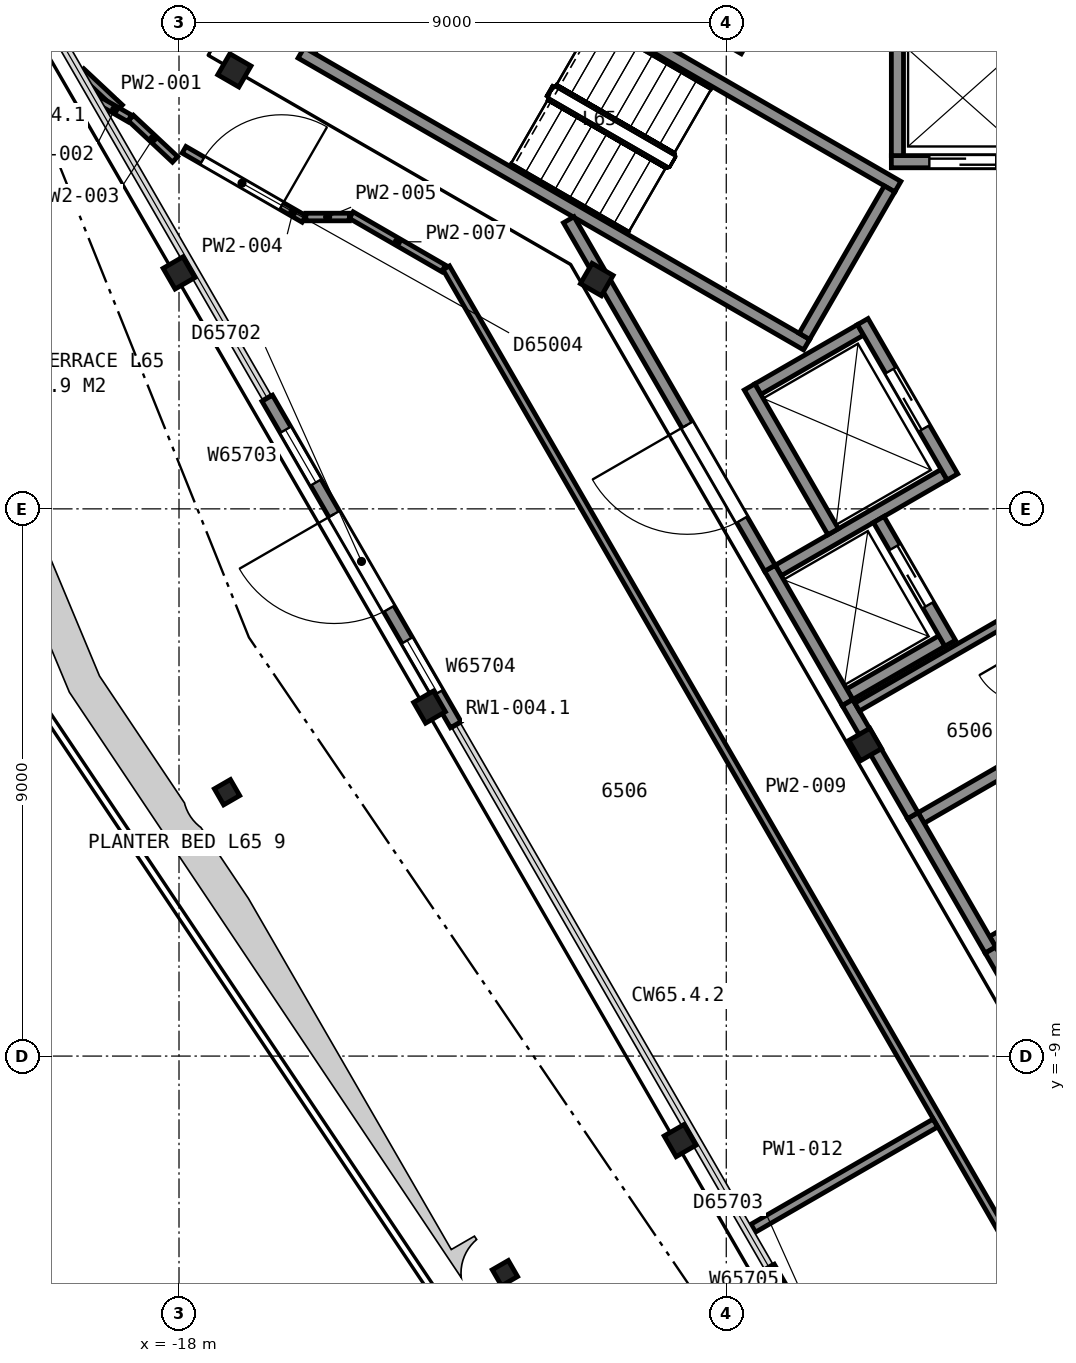
"""IFC4 building model, lengths in metres.
Left out: names, types, materials, properties, quantities, classifications, styles, units other than length and angle.
Written with IfcOpenShell. Run it as: python <this file> out.ifc"""

import sys

from ifc_helpers import new_model, si_unit, direction, frame, frame_2d, origin, origin_2d, place, context, subcontext, project, spatial, rectangle, hollow_rectangle, i_section, extrude, element, fill, save


model = new_model("IFC4")
c1 = context("Model", 3, precision=1e-05, world=origin(), true_north=direction((0.0, 1.0)))
c2 = subcontext(c1, "Body", "Model", "MODEL_VIEW")
j1 = project(units=[si_unit("LENGTHUNIT", "METRE"), si_unit("PLANEANGLEUNIT", "RADIAN")], contexts=[c1])
p1 = place(None, origin())
s1 = spatial("IfcSite", under=j1, at=p1, CompositionType="ELEMENT")
p2 = place(p1, origin())
s2 = spatial("IfcBuilding", under=s1, at=p2, CompositionType="ELEMENT")
p3 = place(p2, frame((0.0, 0.0, 258.2)))
s3 = spatial("IfcBuildingStorey", under=s2, at=p3, CompositionType="ELEMENT", Elevation=258.2)
for number, where, z_axis, x_axis in (
    (1, (-18.0, 3.88, -0.16), (0.0, 0.0, 1.0), (-0.5, 0.866, 0.0)),
    (2, (-13.88, -3.26, -0.16), (0.0, 0.0, 1.0), (-0.5, 0.866, 0.0)),
    (3, (-9.76, -10.39, -0.16), (0.0, 0.0, 1.0), (-0.5, 0.866, 0.0)),
):
    element("IfcColumn", number, at=place(p3, frame(where, z_axis=z_axis, x_axis=x_axis)), inside=s3, PredefinedType="COLUMN", context=c2, shape_type="SweptSolid", body=[
        extrude(i_section(OverallWidth=0.394, OverallDepth=0.376, WebThickness=0.017, FlangeThickness=0.028, FilletRadius=0.015, at=origin_2d()), origin(), (0.0, 0.0, 1.0), 5.96),
    ])
p4 = place(p3, frame((-9.237, 7.987, 0.065), z_axis=(0.331346299182, -0.19115367602, 0.923942585966), x_axis=(0.941301037418, 1.5106804e-05, -0.337568299352)))
e4 = element("IfcColumn", 4, at=p4, inside=s3, PredefinedType="COLUMN", context=c2, shape_type="SweptSolid", body=[
    extrude(i_section(OverallWidth=0.399, OverallDepth=0.386, WebThickness=0.021, FlangeThickness=0.033, FilletRadius=0.015, at=origin_2d()), origin(), (0.0, 0.0, 1.0), 6.137),
])
p5 = place(p3, frame((-17.502, 7.45, 0.05), z_axis=(0.331353135415, -0.19118201328, 0.923934271174), x_axis=(0.50003321387, 0.866006216706, -0.000132867899)))
e5 = element("IfcColumn", 5, at=p5, inside=s3, PredefinedType="COLUMN", context=c2, shape_type="SweptSolid", body=[
    extrude(i_section(OverallWidth=0.401, OverallDepth=0.399, WebThickness=0.025, FlangeThickness=0.04, FilletRadius=0.015, at=origin_2d()), origin(), (0.0, 0.0, 1.0), 6.169),
])
p6 = place(p3, frame((-11.537, 4.007, 0.065), z_axis=(0.331310883947, -0.191156195649, 0.923954764609), x_axis=(0.941310345781, -3.9186308e-05, -0.337542340145)))
e6 = element("IfcColumn", 6, at=p6, inside=s3, PredefinedType="COLUMN", context=c2, shape_type="SweptSolid", body=[
    extrude(i_section(OverallWidth=0.399, OverallDepth=0.386, WebThickness=0.021, FlangeThickness=0.033, FilletRadius=0.015, at=origin_2d()), origin(), (0.0, 0.0, 1.0), 6.137),
])
p7 = place(p3, frame((-6.923, -3.996, 0.04), z_axis=(0.175584774284, 0.101313376069, 0.979237247489), x_axis=(0.984300834882, 5.9817855e-05, -0.176498903317)))
e7 = element("IfcColumn", 7, at=p7, inside=s3, PredefinedType="COLUMN", context=c2, shape_type="SweptSolid", body=[
    extrude(i_section(OverallWidth=0.399, OverallDepth=0.386, WebThickness=0.021, FlangeThickness=0.033, FilletRadius=0.015, at=origin_2d()), origin(), (0.0, 0.0, 1.0), 5.841),
])
for number, where, z_axis, x_axis in (
    (8, (-17.21, -4.66, -0.69), (0.0, 0.0, 1.0), (-0.5, 0.866, 0.0)),
    (9, (-12.64, -12.57, -0.69), (0.0, 0.0, 1.0), (-0.5, 0.866, 0.0)),
):
    element("IfcColumn", number, at=place(p3, frame(where, z_axis=z_axis, x_axis=x_axis)), inside=s3, PredefinedType="COLUMN", context=c2, shape_type="SweptSolid", body=[
        extrude(hollow_rectangle(XDim=0.305, YDim=0.305, WallThickness=0.013, InnerFilletRadius=0.006, OuterFilletRadius=0.019, at=origin_2d()), origin(), (0.0, 0.0, 1.0), 5.4),
    ])
p8 = place(p3, frame((-16.549, 1.82, 0.0), z_axis=(0.0, 0.0, 1.0), x_axis=(0.500009909098, -0.866019682689, 0.0)))
e10 = element("IfcWall", 10, at=p8, inside=s3, PredefinedType="SOLIDWALL", context=c2, shape_type="SweptSolid", body=[
    extrude(rectangle(XDim=6.2, YDim=0.2, at=frame_2d((3.1, 0.0))), origin(), (0.0, 0.0, 1.0), 4.522),
])
p9 = place(p8, frame((0.6, 0.0, 0.9)))
e11 = element("IfcOpeningElement", 11, at=p9, cuts=e10, PredefinedType="OPENING", context=c2, shape_type="SweptSolid", body=[
    extrude(rectangle(XDim=1.0, YDim=1.5, at=frame_2d((0.5, 0.75))), frame((0.0, 0.11, 0.0), z_axis=(0.0, -1.0, 0.0), x_axis=(1.0, 0.0, 0.0)), (0.0, 0.0, 1.0), 0.22),
])
p10 = place(p8, frame((2.2, 0.0, 0.0)))
e12 = element("IfcOpeningElement", 12, at=p10, cuts=e10, PredefinedType="OPENING", context=c2, shape_type="SweptSolid", body=[
    extrude(rectangle(XDim=1.8, YDim=2.4, at=frame_2d((0.9, 1.2))), frame((0.0, 0.11, 0.0), z_axis=(0.0, -1.0, 0.0), x_axis=(1.0, 0.0, 0.0)), (0.0, 0.0, 1.0), 0.22),
])
p11 = place(p8, frame((4.6, 0.0, 0.9)))
e13 = element("IfcOpeningElement", 13, at=p11, cuts=e10, PredefinedType="OPENING", context=c2, shape_type="SweptSolid", body=[
    extrude(rectangle(XDim=1.0, YDim=1.5, at=frame_2d((0.5, 0.75))), frame((0.0, 0.11, 0.0), z_axis=(0.0, -1.0, 0.0), x_axis=(1.0, 0.0, 0.0)), (0.0, 0.0, 1.0), 0.22),
])
p12 = place(p3, frame((-8.296, -12.474, 0.0), z_axis=(0.0, 0.0, 1.0), x_axis=(0.500026960575, -0.86600983753, 0.0)))
e14 = element("IfcWall", 14, at=p12, inside=s3, PredefinedType="SOLIDWALL", context=c2, shape_type="SweptSolid", body=[
    extrude(rectangle(XDim=6.2, YDim=0.2, at=frame_2d((3.1, 0.0))), origin(), (0.0, 0.0, 1.0), 4.522),
])
p13 = place(p12, frame((0.6, 0.0, 0.9)))
e15 = element("IfcOpeningElement", 15, at=p13, cuts=e14, PredefinedType="OPENING", context=c2, shape_type="SweptSolid", body=[
    extrude(rectangle(XDim=1.0, YDim=1.5, at=frame_2d((0.5, 0.75))), frame((0.0, 0.11, 0.0), z_axis=(0.0, -1.0, 0.0), x_axis=(1.0, 0.0, 0.0)), (0.0, 0.0, 1.0), 0.22),
])
p14 = place(p12, frame((2.2, 0.0, 0.0)))
e16 = element("IfcOpeningElement", 16, at=p14, cuts=e14, PredefinedType="OPENING", context=c2, shape_type="SweptSolid", body=[
    extrude(rectangle(XDim=1.8, YDim=2.4, at=frame_2d((0.9, 1.2))), frame((0.0, 0.11, 0.0), z_axis=(0.0, -1.0, 0.0), x_axis=(1.0, 0.0, 0.0)), (0.0, 0.0, 1.0), 0.22),
])
p15 = place(p12, frame((4.6, 0.0, 0.9)))
e17 = element("IfcOpeningElement", 17, at=p15, cuts=e14, PredefinedType="OPENING", context=c2, shape_type="SweptSolid", body=[
    extrude(rectangle(XDim=1.0, YDim=1.5, at=frame_2d((0.5, 0.75))), frame((0.0, 0.11, 0.0), z_axis=(0.0, -1.0, 0.0), x_axis=(1.0, 0.0, 0.0)), (0.0, 0.0, 1.0), 0.22),
])
p16 = place(p3, frame((-14.455, 9.962, 0.0), z_axis=(0.0, 0.0, 1.0), x_axis=(-0.500049511043, -0.865996816683, 0.0)))
e18 = element("IfcWall", 18, at=p16, inside=s3, PredefinedType="PARTITIONING", context=c2, shape_type="SweptSolid", body=[
    extrude(rectangle(XDim=2.8, YDim=0.2, at=frame_2d((1.4, 0.0))), origin(), (0.0, 0.0, 1.0), 5.55),
])
p17 = place(p16, frame((0.85, 0.0, 0.0)))
e19 = element("IfcOpeningElement", 19, at=p17, cuts=e18, PredefinedType="OPENING", context=c2, shape_type="SweptSolid", body=[
    extrude(rectangle(XDim=1.1, YDim=2.1, at=frame_2d((0.55, 1.05))), frame((0.0, 0.11, 0.0), z_axis=(0.0, -1.0, 0.0), x_axis=(1.0, 0.0, 0.0)), (0.0, 0.0, 1.0), 0.22),
])
for number, where, z_axis, x_axis in (
    (20, (-7.678, 2.701, 0.0), (0.0, 0.0, 1.0), (-0.866, 0.5, 0.0)),
    (21, (-6.178, 5.299, 0.0), (0.0, 0.0, 1.0), (-0.866, 0.5, 0.0)),
):
    element("IfcWall", number, at=place(p3, frame(where, z_axis=z_axis, x_axis=x_axis)), inside=s3, PredefinedType="PARTITIONING", context=c2, shape_type="SweptSolid", body=[
        extrude(rectangle(XDim=9.6, YDim=0.2, at=frame_2d((4.8, 0.0))), origin(), (0.0, 0.0, 1.0), 5.55),
    ])
p18 = place(p3, frame((-6.315, 5.262, 0.0), z_axis=(0.0, 0.0, 1.0), x_axis=(-0.500049511043, -0.865996816683, 0.0)))
e22 = element("IfcWall", 22, at=p18, inside=s3, PredefinedType="PARTITIONING", context=c2, shape_type="SweptSolid", body=[
    extrude(rectangle(XDim=2.8, YDim=0.2, at=frame_2d((1.4, 0.0))), origin(), (0.0, 0.0, 1.0), 5.55),
])
p19 = place(p3, frame((-6.285, 5.71, 0.0), z_axis=(0.0, 0.0, 1.0), x_axis=(1.0, 0.0, 0.0)))
e23 = element("IfcWall", 23, at=p19, inside=s3, PredefinedType="PARTITIONING", context=c2, shape_type="SweptSolid", body=[
    extrude(rectangle(XDim=2.35, YDim=0.2, at=frame_2d((1.175, 0.0))), origin(), (0.0, 0.0, 1.0), 5.55),
])
p20 = place(p19, frame((0.625, 0.0, 0.0)))
e24 = element("IfcOpeningElement", 24, at=p20, cuts=e23, PredefinedType="OPENING", context=c2, shape_type="SweptSolid", body=[
    extrude(rectangle(XDim=1.1, YDim=2.1, at=frame_2d((0.55, 1.05))), frame((0.0, 0.11, 0.0), z_axis=(0.0, -1.0, 0.0), x_axis=(1.0, 0.0, 0.0)), (0.0, 0.0, 1.0), 0.22),
])
p21 = place(p3, frame((-4.62, -7.118, 0.0), z_axis=(0.0, 0.0, 1.0), x_axis=(0.866039495442, 0.49997559174, 0.0)))
e25 = element("IfcWall", 25, at=p21, inside=s3, PredefinedType="PARTITIONING", context=c2, shape_type="SweptSolid", body=[
    extrude(rectangle(XDim=2.95, YDim=0.2, at=frame_2d((1.475, 0.0))), origin(), (0.0, 0.0, 1.0), 4.933),
])
for number, where, z_axis, x_axis in (
    (26, (-5.795, -5.083, 0.0), (0.0, 0.0, 1.0), (0.866, 0.5, 0.0)),
    (27, (-6.97, -3.048, 0.0), (0.0, 0.0, 1.0), (0.866, 0.5, 0.0)),
):
    element("IfcWall", number, at=place(p3, frame(where, z_axis=z_axis, x_axis=x_axis)), inside=s3, PredefinedType="PARTITIONING", context=c2, shape_type="SweptSolid", body=[
        extrude(rectangle(XDim=1.75, YDim=0.2, at=frame_2d((0.875, 0.0))), origin(), (0.0, 0.0, 1.0), 4.933),
    ])
p22 = place(p3, frame((-8.145, -1.013, 0.0), z_axis=(0.0, 0.0, 1.0), x_axis=(0.866016494683, 0.500015430699, 0.0)))
e28 = element("IfcWall", 28, at=p22, inside=s3, PredefinedType="PARTITIONING", context=c2, shape_type="SweptSolid", body=[
    extrude(rectangle(XDim=3.15, YDim=0.2, at=frame_2d((1.575, 0.0))), origin(), (0.0, 0.0, 1.0), 4.933),
])
p23 = place(p3, frame((-8.48, 1.969, 0.0), z_axis=(0.0, 0.0, 1.0), x_axis=(0.866000020948, 0.500043961785, 0.0)))
e29 = element("IfcWall", 29, at=p23, inside=s3, PredefinedType="PARTITIONING", context=c2, shape_type="SweptSolid", body=[
    extrude(rectangle(XDim=1.95, YDim=0.2, at=frame_2d((0.975, 0.0))), origin(), (0.0, 0.0, 1.0), 5.8),
])
p24 = place(p3, frame((-6.185, 5.81, 0.0), z_axis=(0.0, 0.0, 1.0), x_axis=(0.0, 1.0, 0.0)))
e30 = element("IfcWall", 30, at=p24, inside=s3, PredefinedType="PARTITIONING", context=c2, shape_type="SweptSolid", body=[
    extrude(rectangle(XDim=1.75, YDim=0.2, at=frame_2d((0.875, 0.0))), origin(), (0.0, 0.0, 1.0), 4.933),
])
p25 = place(p3, frame((-5.28, 0.525, 0.0), z_axis=(0.0, 0.0, 1.0), x_axis=(-0.500037662692, 0.866003658127, 0.0)))
e31 = element("IfcWall", 31, at=p25, inside=s3, PredefinedType="PARTITIONING", context=c2, shape_type="SweptSolid", body=[
    extrude(rectangle(XDim=2.95, YDim=0.2, at=frame_2d((1.475, 0.0))), origin(), (0.0, 0.0, 1.0), 5.8),
])
p26 = place(p25, frame((0.925, 0.0, 0.0)))
e32 = element("IfcOpeningElement", 32, at=p26, cuts=e31, PredefinedType="OPENING", context=c2, shape_type="SweptSolid", body=[
    extrude(rectangle(XDim=1.1, YDim=2.1, at=frame_2d((0.55, 1.05))), frame((0.0, 0.11, 0.0), z_axis=(0.0, -1.0, 0.0), x_axis=(1.0, 0.0, 0.0)), (0.0, 0.0, 1.0), 0.22),
])
p27 = place(p3, frame((-5.318, -2.21, 0.0), z_axis=(0.0, 0.0, 1.0), x_axis=(-0.499938297808, 0.866061024631, 0.0)))
e33 = element("IfcWall", 33, at=p27, inside=s3, PredefinedType="PARTITIONING", context=c2, shape_type="SweptSolid", body=[
    extrude(rectangle(XDim=2.35, YDim=0.2, at=frame_2d((1.175, 0.0))), origin(), (0.0, 0.0, 1.0), 5.55),
])
p28 = place(p27, frame((0.725, 0.0, 0.0)))
e34 = element("IfcOpeningElement", 34, at=p28, cuts=e33, PredefinedType="OPENING", context=c2, shape_type="SweptSolid", body=[
    extrude(rectangle(XDim=1.1, YDim=2.1, at=frame_2d((0.55, 1.05))), frame((0.0, 0.11, 0.0), z_axis=(0.0, -1.0, 0.0), x_axis=(1.0, 0.0, 0.0)), (0.0, 0.0, 1.0), 0.22),
])
p29 = place(p3, frame((-7.242, -0.376, 0.0), z_axis=(0.0, 0.0, 1.0), x_axis=(-0.499996545922, 0.866027397988, 0.0)))
e35 = element("IfcWall", 35, at=p29, inside=s3, PredefinedType="PARTITIONING", context=c2, shape_type="SweptSolid", body=[
    extrude(rectangle(XDim=2.75, YDim=0.2, at=frame_2d((1.375, 0.0))), origin(), (0.0, 0.0, 1.0), 5.8),
])
for number, where, z_axis, x_axis in (
    (36, (-4.656, -7.255, 0.0), (0.0, 0.0, 1.0), (-0.5, 0.866, 0.0)),
    (37, (-7.006, -3.185, 0.0), (0.0, 0.0, 1.0), (-0.5, 0.866, 0.0)),
):
    element("IfcWall", number, at=place(p3, frame(where, z_axis=z_axis, x_axis=x_axis)), inside=s3, PredefinedType="PARTITIONING", context=c2, shape_type="SweptSolid", body=[
        extrude(rectangle(XDim=2.55, YDim=0.2, at=frame_2d((1.275, 0.0))), origin(), (0.0, 0.0, 1.0), 5.55),
    ])
p30 = place(p3, frame((-11.591, 4.755, 0.0), z_axis=(0.0, 0.0, 1.0), x_axis=(0.500043977787, -0.866000011708, 0.0)))
e38 = element("IfcWall", 38, at=p30, inside=s3, PredefinedType="PARTITIONING", context=c2, shape_type="SweptSolid", body=[
    extrude(rectangle(XDim=6.617, YDim=0.2, at=frame_2d((3.308, 0.0))), origin(), (0.0, 0.0, 1.0), 4.897),
])
p31 = place(p30, frame((3.895, 0.0, 0.0)))
e39 = element("IfcOpeningElement", 39, at=p31, cuts=e38, PredefinedType="OPENING", context=c2, shape_type="SweptSolid", body=[
    extrude(rectangle(XDim=1.8, YDim=2.1, at=frame_2d((0.9, 1.05))), frame((0.0, 0.11, 0.0), z_axis=(0.0, -1.0, 0.0), x_axis=(1.0, 0.0, 0.0)), (0.0, 0.0, 1.0), 0.22),
])
p32 = place(p3, frame((-7.005, -3.187, 0.0), z_axis=(0.0, 0.0, 1.0), x_axis=(0.50031363248, -0.86584425225, 0.0)))
e40 = element("IfcWall", 40, at=p32, inside=s3, PredefinedType="PARTITIONING", context=c2, shape_type="SweptSolid", body=[
    extrude(rectangle(XDim=2.145, YDim=0.2, at=frame_2d((1.072, 0.0))), origin(), (0.0, 0.0, 1.0), 5.19),
])
p33 = place(p3, frame((-6.847, -3.26, 0.0), z_axis=(0.0, 0.0, 1.0), x_axis=(0.866017493347, 0.500013701029, 0.0)))
e41 = element("IfcWall", 41, at=p33, inside=s3, PredefinedType="PARTITIONING", context=c2, shape_type="SweptSolid", body=[
    extrude(rectangle(XDim=2.975, YDim=0.15, at=frame_2d((1.488, 0.0))), origin(), (0.0, 0.0, 1.0), 4.933),
])
p34 = place(p3, frame((-4.655, -7.257, 0.0), z_axis=(0.0, 0.0, 1.0), x_axis=(0.499966124405, -0.866044960985, 0.0)))
e42 = element("IfcWall", 42, at=p34, inside=s3, PredefinedType="PARTITIONING", context=c2, shape_type="SweptSolid", body=[
    extrude(rectangle(XDim=5.956, YDim=0.2, at=frame_2d((2.978, 0.0))), origin(), (0.0, 0.0, 1.0), 4.897),
])
p35 = place(p3, frame((-19.608, 7.192, 0.0), z_axis=(0.0, 0.0, 1.0), x_axis=(0.729729583448, -0.683735866428, 0.0)))
e43 = element("IfcWall", 43, at=p35, inside=s3, PredefinedType="PARTITIONING", context=c2, shape_type="SweptSolid", body=[
    extrude(rectangle(XDim=0.871, YDim=0.125, at=frame_2d((0.435, 0.0))), origin(), (0.0, 0.0, 1.0), 4.462),
])
p36 = place(p3, frame((-19.306, 6.708, 0.0), z_axis=(0.0, 0.0, 1.0), x_axis=(0.866107403877, -0.499857944771, 0.0)))
e44 = element("IfcWall", 44, at=p36, inside=s3, PredefinedType="PARTITIONING", context=c2, shape_type="SweptSolid", body=[
    extrude(rectangle(XDim=0.572, YDim=0.125, at=frame_2d((0.286, 0.0))), origin(), (0.0, 0.0, 1.0), 4.462),
])
p37 = place(p3, frame((-18.792, 6.428, 0.0), z_axis=(0.0, 0.0, 1.0), x_axis=(0.730385905706, -0.683034720015, 0.0)))
e45 = element("IfcWall", 45, at=p37, inside=s3, PredefinedType="PARTITIONING", context=c2, shape_type="SweptSolid", body=[
    extrude(rectangle(XDim=0.995, YDim=0.125, at=frame_2d((0.498, 0.0))), origin(), (0.0, 0.0, 1.0), 4.462),
])
p38 = place(p3, frame((-15.945, 4.769, 0.0), z_axis=(0.0, 0.0, 1.0), x_axis=(-0.866296257949, 0.499530573103, 0.0)))
e46 = element("IfcWall", 46, at=p38, inside=s3, PredefinedType="PARTITIONING", context=c2, shape_type="SweptSolid", body=[
    extrude(rectangle(XDim=2.277, YDim=0.125, at=frame_2d((1.138, 0.0))), origin(), (0.0, 0.0, 1.0), 4.462),
])
p39 = place(p38, frame((0.427, 0.0, 0.0)))
e47 = element("IfcOpeningElement", 47, at=p39, cuts=e46, PredefinedType="OPENING", context=c2, shape_type="SweptSolid", body=[
    extrude(rectangle(XDim=1.5, YDim=2.1, at=frame_2d((0.75, 1.05))), frame((0.0, 0.073, 0.0), z_axis=(0.0, -1.0, 0.0), x_axis=(1.0, 0.0, 0.0)), (0.0, 0.0, 1.0), 0.145),
])
p40 = place(p3, frame((-15.914, 4.8, 0.0), z_axis=(0.0, 0.0, 1.0), x_axis=(1.0, 0.0, 0.0)))
e48 = element("IfcWall", 48, at=p40, inside=s3, PredefinedType="PARTITIONING", context=c2, shape_type="SweptSolid", body=[
    extrude(rectangle(XDim=0.716, YDim=0.125, at=frame_2d((0.358, 0.0))), origin(), (0.0, 0.0, 1.0), 4.462),
])
p41 = place(p3, frame((-15.167, 4.831, 0.0), z_axis=(0.0, 0.0, 1.0), x_axis=(0.865930689144, -0.500164014697, 0.0)))
e49 = element("IfcWall", 49, at=p41, inside=s3, PredefinedType="PARTITIONING", context=c2, shape_type="SweptSolid", body=[
    extrude(rectangle(XDim=1.755, YDim=0.125, at=frame_2d((0.877, 0.0))), origin(), (0.0, 0.0, 1.0), 4.462),
])
p42 = place(p3, frame((-13.605, 3.965, 0.0), z_axis=(0.0, 0.0, 1.0), x_axis=(0.499986289957, -0.866033319137, 0.0)))
e50 = element("IfcWall", 50, at=p42, inside=s3, PredefinedType="PARTITIONING", context=c2, shape_type="SweptSolid", body=[
    extrude(rectangle(XDim=19.731, YDim=0.125, at=frame_2d((9.866, 0.0))), origin(), (0.0, 0.0, 1.0), 4.462),
])
p43 = place(p3, frame((-8.557, -11.831, 0.0), z_axis=(0.0, 0.0, 1.0), x_axis=(0.866053925764, 0.499950595228, 0.0)))
e51 = element("IfcWall", 51, at=p43, inside=s3, PredefinedType="PARTITIONING", context=c2, shape_type="SweptSolid", body=[
    extrude(rectangle(XDim=3.458, YDim=0.15, at=frame_2d((1.729, 0.0))), origin(), (0.0, 0.0, 1.0), 4.462),
])
p44 = place(p9, origin())
e52 = element("IfcWindow", 52, at=p44, inside=s3, PartitioningType="SINGLE_PANEL", PredefinedType="WINDOW", context=c2, shape_type="SweptSolid", body=[
    extrude(rectangle(XDim=1.0, YDim=1.5, at=frame_2d((0.5, 0.75))), frame((0.0, 0.03, 0.0), z_axis=(0.0, -1.0, 0.0), x_axis=(1.0, 0.0, 0.0)), (0.0, 0.0, 1.0), 0.06),
])
fill(e11, e52)
p45 = place(p10, frame((1.8, 0.0, 0.0), z_axis=(0.0, 0.0, 1.0), x_axis=(-1.0, 0.0, 0.0)))
e53 = element("IfcDoor", 53, at=p45, inside=s3, OperationType="DOUBLE_DOOR_SINGLE_SWING", PredefinedType="DOOR", context=c2, shape_type="SweptSolid", body=[
    extrude(rectangle(XDim=1.8, YDim=2.4, at=frame_2d((0.9, 1.2))), frame((0.0, 0.025, 0.0), z_axis=(0.0, -1.0, 0.0), x_axis=(1.0, 0.0, 0.0)), (0.0, 0.0, 1.0), 0.05),
])
fill(e12, e53)
p46 = place(p11, origin())
e54 = element("IfcWindow", 54, at=p46, inside=s3, PartitioningType="SINGLE_PANEL", PredefinedType="WINDOW", context=c2, shape_type="SweptSolid", body=[
    extrude(rectangle(XDim=1.0, YDim=1.5, at=frame_2d((0.5, 0.75))), frame((0.0, 0.03, 0.0), z_axis=(0.0, -1.0, 0.0), x_axis=(1.0, 0.0, 0.0)), (0.0, 0.0, 1.0), 0.06),
])
fill(e13, e54)
p47 = place(p20, origin())
e55 = element("IfcDoor", 55, at=p47, inside=s3, OperationType="SLIDING_TO_RIGHT", PredefinedType="DOOR", context=c2, shape_type="SweptSolid", body=[
    extrude(rectangle(XDim=1.1, YDim=2.1, at=frame_2d((0.55, 1.05))), frame((0.0, 0.025, 0.0), z_axis=(0.0, -1.0, 0.0), x_axis=(1.0, 0.0, 0.0)), (0.0, 0.0, 1.0), 0.05),
])
fill(e24, e55)
p48 = place(p28, origin())
e56 = element("IfcDoor", 56, at=p48, inside=s3, OperationType="SLIDING_TO_RIGHT", PredefinedType="DOOR", context=c2, shape_type="SweptSolid", body=[
    extrude(rectangle(XDim=1.1, YDim=2.1, at=frame_2d((0.55, 1.05))), frame((0.0, 0.025, 0.0), z_axis=(0.0, -1.0, 0.0), x_axis=(1.0, 0.0, 0.0)), (0.0, 0.0, 1.0), 0.05),
])
fill(e34, e56)
p49 = place(p26, origin())
e57 = element("IfcDoor", 57, at=p49, inside=s3, OperationType="SLIDING_TO_LEFT", PredefinedType="DOOR", context=c2, shape_type="SweptSolid", body=[
    extrude(rectangle(XDim=1.1, YDim=2.1, at=frame_2d((0.55, 1.05))), frame((0.0, 0.025, 0.0), z_axis=(0.0, -1.0, 0.0), x_axis=(1.0, 0.0, 0.0)), (0.0, 0.0, 1.0), 0.05),
])
fill(e32, e57)
p50 = place(p31, origin())
e58 = element("IfcDoor", 58, at=p50, inside=s3, OperationType="DOUBLE_DOOR_SINGLE_SWING", PredefinedType="DOOR", context=c2, shape_type="SweptSolid", body=[
    extrude(rectangle(XDim=1.8, YDim=2.1, at=frame_2d((0.9, 1.05))), frame((0.0, 0.025, 0.0), z_axis=(0.0, -1.0, 0.0), x_axis=(1.0, 0.0, 0.0)), (0.0, 0.0, 1.0), 0.05),
])
fill(e39, e58)
p51 = place(p39, origin())
e59 = element("IfcDoor", 59, at=p51, inside=s3, OperationType="DOUBLE_DOOR_SINGLE_SWING", PredefinedType="DOOR", context=c2, shape_type="SweptSolid", body=[
    extrude(rectangle(XDim=1.5, YDim=2.1, at=frame_2d((0.75, 1.05))), frame((0.0, 0.025, 0.0), z_axis=(0.0, -1.0, 0.0), x_axis=(1.0, 0.0, 0.0)), (0.0, 0.0, 1.0), 0.05),
])
fill(e47, e59)
save(model, sys.argv[1])
